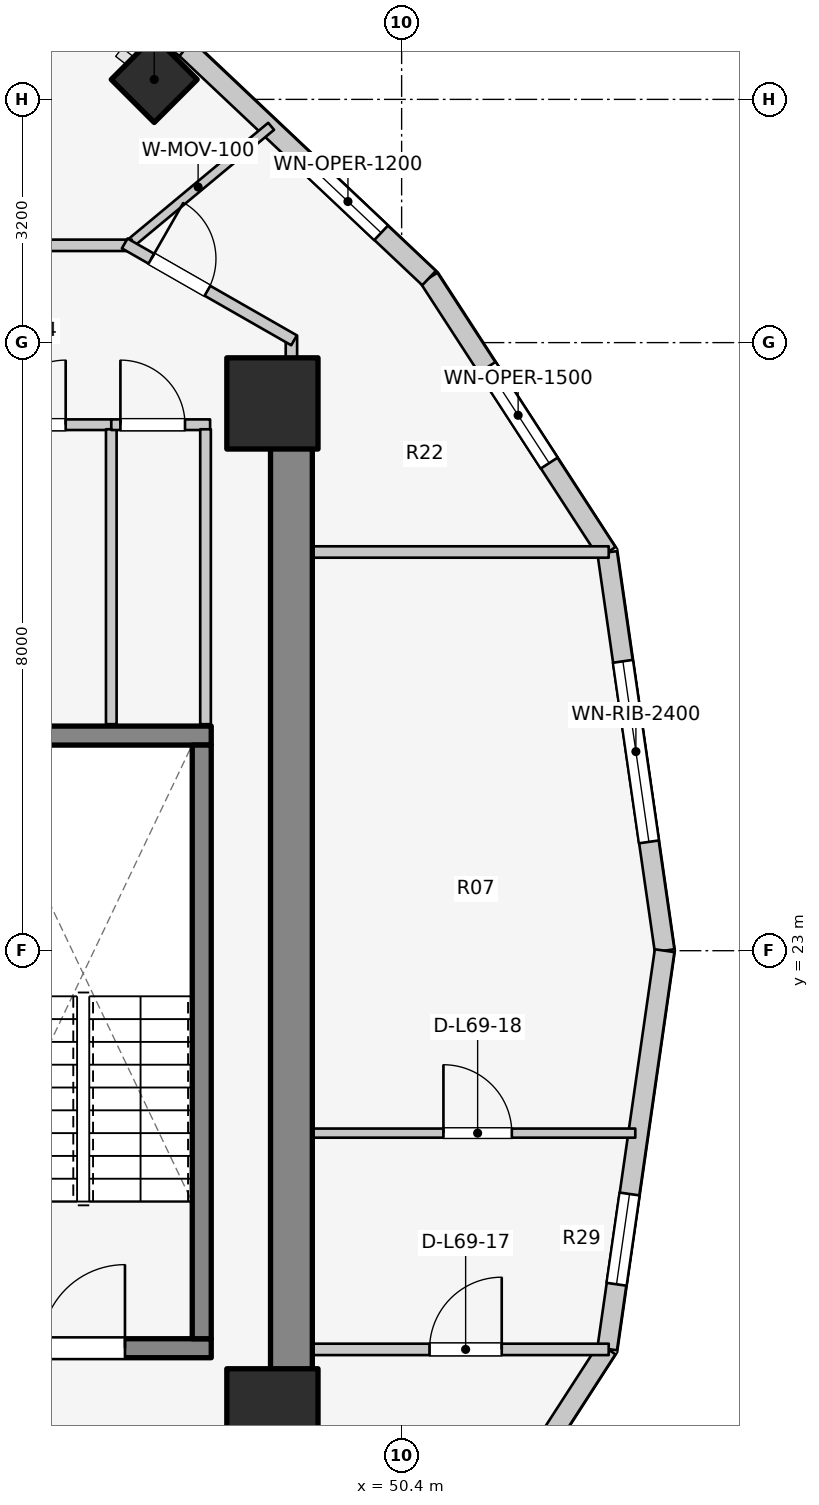
"""IFC4 building model, lengths in metres.
Left out: names, types, materials, properties, quantities, classifications, styles, units other than length and angle.
Written with IfcOpenShell. Run it as: python <this file> out.ifc"""

import sys

from ifc_helpers import new_model, si_unit, direction, frame, frame_2d, origin, origin_2d, place, context, subcontext, project, spatial, rectangle, extrude, element, fill, save


model = new_model("IFC4")
c1 = context("Model", 3, precision=1e-05, world=origin(), true_north=direction((0.0, 1.0)))
c2 = subcontext(c1, "Body", "Model", "MODEL_VIEW")
j1 = project(units=[si_unit("LENGTHUNIT", "METRE"), si_unit("PLANEANGLEUNIT", "RADIAN")], contexts=[c1])
p1 = place(None, origin())
s1 = spatial("IfcSite", under=j1, at=p1, CompositionType="ELEMENT")
p2 = place(p1, origin())
s2 = spatial("IfcBuilding", under=s1, at=p2, CompositionType="ELEMENT")
p3 = place(p2, frame((0.0, 0.0, 226.4)))
s3 = spatial("IfcBuildingStorey", under=s2, at=p3, CompositionType="ELEMENT", Elevation=226.4)
p4 = place(p3, frame((48.95, 17.05, 0.0), z_axis=(0.0, 0.0, 1.0), x_axis=(0.0, 1.0, 0.0)))
e1 = element("IfcWall", 1, at=p4, inside=s3, PredefinedType="SHEAR", context=c2, shape_type="SweptSolid", body=[
    extrude(rectangle(XDim=12.8, YDim=0.55, at=frame_2d((6.4, 0.0))), origin(), (0.0, 0.0, 1.0), 3.1),
])
p5 = place(p3, frame((44.525, 17.77, 0.0), z_axis=(0.0, 0.0, 1.0), x_axis=(1.0, 0.0, 0.0)))
e2 = element("IfcWall", 2, at=p5, inside=s3, PredefinedType="SOLIDWALL", context=c2, shape_type="SweptSolid", body=[
    extrude(rectangle(XDim=3.37, YDim=0.25, at=frame_2d((1.685, 0.0))), origin(), (0.0, 0.0, 1.0), 3.1),
])
p6 = place(p5, frame((1.135, 0.0, 0.0)))
e3 = element("IfcOpeningElement", 3, at=p6, cuts=e2, PredefinedType="OPENING", context=c2, shape_type="SweptSolid", body=[
    extrude(rectangle(XDim=1.1, YDim=2.1, at=frame_2d((0.55, 1.05))), frame((0.0, 0.135, 0.0), z_axis=(0.0, -1.0, 0.0), x_axis=(1.0, 0.0, 0.0)), (0.0, 0.0, 1.0), 0.27),
])
p7 = place(p3, frame((44.525, 25.83, 0.0), z_axis=(0.0, 0.0, 1.0), x_axis=(1.0, 0.0, 0.0)))
e4 = element("IfcWall", 4, at=p7, inside=s3, PredefinedType="SOLIDWALL", context=c2, shape_type="SweptSolid", body=[
    extrude(rectangle(XDim=3.37, YDim=0.25, at=frame_2d((1.685, 0.0))), origin(), (0.0, 0.0, 1.0), 3.1),
])
p8 = place(p3, frame((47.77, 17.895, 0.0), z_axis=(0.0, 0.0, 1.0), x_axis=(0.0, 1.0, 0.0)))
e5 = element("IfcWall", 5, at=p8, inside=s3, PredefinedType="SOLIDWALL", context=c2, shape_type="SweptSolid", body=[
    extrude(rectangle(XDim=7.81, YDim=0.25, at=frame_2d((3.905, 0.0))), origin(), (0.0, 0.0, 1.0), 3.1),
])
for number, where, z_axis, x_axis in (
    (6, (48.7, 16.9, 0.0), (0.0, 0.0, 1.0), (1.0, 0.0, 0.0)),
    (7, (48.7, 30.2, 0.0), (0.0, 0.0, 1.0), (1.0, 0.0, 0.0)),
):
    element("IfcColumn", number, at=place(p3, frame(where, z_axis=z_axis, x_axis=x_axis)), inside=s3, PredefinedType="COLUMN", context=c2, shape_type="SweptSolid", body=[
        extrude(rectangle(XDim=1.2, YDim=1.2, at=origin_2d()), origin(), (0.0, 0.0, 1.0), 3.1),
    ])
p9 = place(p3, frame((47.145, 34.462, 0.0), z_axis=(0.0, 0.0, 1.0), x_axis=(0.707106781187, 0.707106781187, 0.0)))
e8 = element("IfcColumn", 8, at=p9, inside=s3, PredefinedType="COLUMN", context=c2, shape_type="SweptSolid", body=[
    extrude(rectangle(XDim=0.8, YDim=0.8, at=origin_2d()), origin(), (0.0, 0.0, 1.0), 3.1),
])
p10 = place(p3, frame((53.86, 23.0, 0.0), z_axis=(0.0, 0.0, 1.0), x_axis=(-0.142712754019, 0.989764148593, 0.0)))
e9 = element("IfcWall", 9, at=p10, inside=s3, PredefinedType="STANDARD", context=c2, shape_type="SweptSolid", body=[
    extrude(rectangle(XDim=5.293, YDim=0.26, at=frame_2d((2.646, 0.0))), origin(), (0.0, 0.0, 1.0), 2.85),
])
p11 = place(p10, frame((1.447, 0.0, 0.75)))
e10 = element("IfcOpeningElement", 10, at=p11, cuts=e9, PredefinedType="OPENING", context=c2, shape_type="SweptSolid", body=[
    extrude(rectangle(XDim=2.4, YDim=1.7, at=frame_2d((1.2, 0.85))), frame((0.0, 0.14, 0.0), z_axis=(0.0, -1.0, 0.0), x_axis=(1.0, 0.0, 0.0)), (0.0, 0.0, 1.0), 0.28),
])
p12 = place(p3, frame((53.105, 28.239, 0.0), z_axis=(0.0, 0.0, 1.0), x_axis=(-0.544475908819, 0.838776480784, 0.0)))
e11 = element("IfcWall", 11, at=p12, inside=s3, PredefinedType="STANDARD", context=c2, shape_type="SweptSolid", body=[
    extrude(rectangle(XDim=4.305, YDim=0.26, at=frame_2d((2.152, 0.0))), origin(), (0.0, 0.0, 1.0), 2.85),
])
p13 = place(p12, frame((1.402, 0.0, 0.75)))
e12 = element("IfcOpeningElement", 12, at=p13, cuts=e11, PredefinedType="OPENING", context=c2, shape_type="SweptSolid", body=[
    extrude(rectangle(XDim=1.5, YDim=1.6, at=frame_2d((0.75, 0.8))), frame((0.0, 0.14, 0.0), z_axis=(0.0, -1.0, 0.0), x_axis=(1.0, 0.0, 0.0)), (0.0, 0.0, 1.0), 0.28),
])
p14 = place(p3, frame((50.761, 31.849, 0.0), z_axis=(0.0, 0.0, 1.0), x_axis=(-0.72731899451, 0.686299555752, 0.0)))
e13 = element("IfcWall", 13, at=p14, inside=s3, PredefinedType="STANDARD", context=c2, shape_type="SweptSolid", body=[
    extrude(rectangle(XDim=4.404, YDim=0.26, at=frame_2d((2.202, 0.0))), origin(), (0.0, 0.0, 1.0), 2.85),
])
p15 = place(p14, frame((0.867, 0.0, 0.75)))
e14 = element("IfcOpeningElement", 14, at=p15, cuts=e13, PredefinedType="OPENING", context=c2, shape_type="SweptSolid", body=[
    extrude(rectangle(XDim=1.2, YDim=1.5, at=frame_2d((0.6, 0.75))), frame((0.0, 0.14, 0.0), z_axis=(0.0, -1.0, 0.0), x_axis=(1.0, 0.0, 0.0)), (0.0, 0.0, 1.0), 0.28),
])
p16 = place(p3, frame((47.558, 34.872, 0.0), z_axis=(0.0, 0.0, 1.0), x_axis=(-0.790126214723, 0.612944177563, 0.0)))
e15 = element("IfcWall", 15, at=p16, inside=s3, PredefinedType="STANDARD", context=c2, shape_type="SweptSolid", body=[
    extrude(rectangle(XDim=4.667, YDim=0.26, at=frame_2d((2.333, 0.0))), origin(), (0.0, 0.0, 1.0), 2.85),
])
p17 = place(p3, frame((50.761, 14.133, 0.0), z_axis=(0.0, 0.0, 1.0), x_axis=(0.542641766008, 0.839964233634, 0.0)))
e16 = element("IfcWall", 16, at=p17, inside=s3, PredefinedType="STANDARD", context=c2, shape_type="SweptSolid", body=[
    extrude(rectangle(XDim=4.319, YDim=0.26, at=frame_2d((2.16, 0.0))), origin(), (0.0, 0.0, 1.0), 2.85),
])
p18 = place(p17, frame((1.41, 0.0, 0.75)))
e17 = element("IfcOpeningElement", 17, at=p18, cuts=e16, PredefinedType="OPENING", context=c2, shape_type="SweptSolid", body=[
    extrude(rectangle(XDim=1.5, YDim=1.6, at=frame_2d((0.75, 0.8))), frame((0.0, 0.14, 0.0), z_axis=(0.0, -1.0, 0.0), x_axis=(1.0, 0.0, 0.0)), (0.0, 0.0, 1.0), 0.28),
])
p19 = place(p3, frame((53.105, 17.761, 0.0), z_axis=(0.0, 0.0, 1.0), x_axis=(0.142712754019, 0.989764148593, 0.0)))
e18 = element("IfcWall", 18, at=p19, inside=s3, PredefinedType="STANDARD", context=c2, shape_type="SweptSolid", body=[
    extrude(rectangle(XDim=5.293, YDim=0.26, at=frame_2d((2.646, 0.0))), origin(), (0.0, 0.0, 1.0), 2.85),
])
p20 = place(p19, frame((0.859, 0.0, 0.75)))
e19 = element("IfcOpeningElement", 19, at=p20, cuts=e18, PredefinedType="OPENING", context=c2, shape_type="SweptSolid", body=[
    extrude(rectangle(XDim=1.2, YDim=1.5, at=frame_2d((0.6, 0.75))), frame((0.0, 0.14, 0.0), z_axis=(0.0, -1.0, 0.0), x_axis=(1.0, 0.0, 0.0)), (0.0, 0.0, 1.0), 0.28),
])
p21 = place(p3, frame((44.58, 29.92, 0.0), z_axis=(0.0, 0.0, 1.0), x_axis=(1.0, 0.0, 0.0)))
e20 = element("IfcWall", 20, at=p21, inside=s3, PredefinedType="PLUMBINGWALL", context=c2, shape_type="SweptSolid", body=[
    extrude(rectangle(XDim=2.0, YDim=0.14, at=frame_2d((1.0, 0.0))), origin(), (0.0, 0.0, 1.0), 2.855),
])
p22 = place(p21, frame((0.55, 0.0, 0.0)))
e21 = element("IfcOpeningElement", 21, at=p22, cuts=e20, PredefinedType="OPENING", context=c2, shape_type="SweptSolid", body=[
    extrude(rectangle(XDim=0.85, YDim=2.05, at=frame_2d((0.425, 1.025))), frame((0.0, 0.08, 0.0), z_axis=(0.0, -1.0, 0.0), x_axis=(1.0, 0.0, 0.0)), (0.0, 0.0, 1.0), 0.16),
])
p23 = place(p3, frame((46.58, 25.98, 0.0), z_axis=(0.0, 0.0, 1.0), x_axis=(0.0, 1.0, 0.0)))
e22 = element("IfcWall", 22, at=p23, inside=s3, PredefinedType="PLUMBINGWALL", context=c2, shape_type="SweptSolid", body=[
    extrude(rectangle(XDim=3.88, YDim=0.14, at=frame_2d((1.94, 0.0))), origin(), (0.0, 0.0, 1.0), 2.855),
])
p24 = place(p3, frame((46.58, 29.92, 0.0), z_axis=(0.0, 0.0, 1.0), x_axis=(1.0, 0.0, 0.0)))
e23 = element("IfcWall", 23, at=p24, inside=s3, PredefinedType="PLUMBINGWALL", context=c2, shape_type="SweptSolid", body=[
    extrude(rectangle(XDim=1.3, YDim=0.14, at=frame_2d((0.65, 0.0))), origin(), (0.0, 0.0, 1.0), 2.855),
])
p25 = place(p24, frame((0.12, 0.0, 0.0)))
e24 = element("IfcOpeningElement", 24, at=p25, cuts=e23, PredefinedType="OPENING", context=c2, shape_type="SweptSolid", body=[
    extrude(rectangle(XDim=0.85, YDim=2.05, at=frame_2d((0.425, 1.025))), frame((0.0, 0.08, 0.0), z_axis=(0.0, -1.0, 0.0), x_axis=(1.0, 0.0, 0.0)), (0.0, 0.0, 1.0), 0.16),
])
p26 = place(p3, frame((47.82, 25.98, 0.0), z_axis=(0.0, 0.0, 1.0), x_axis=(0.0, 1.0, 0.0)))
e25 = element("IfcWall", 25, at=p26, inside=s3, PredefinedType="PLUMBINGWALL", context=c2, shape_type="SweptSolid", body=[
    extrude(rectangle(XDim=3.88, YDim=0.14, at=frame_2d((1.94, 0.0))), origin(), (0.0, 0.0, 1.0), 2.855),
])
p27 = place(p3, frame((48.95, 17.755, 0.0), z_axis=(0.0, 0.0, 1.0), x_axis=(1.0, 0.0, 0.0)))
e26 = element("IfcWall", 26, at=p27, inside=s3, PredefinedType="PARTITIONING", context=c2, shape_type="SweptSolid", body=[
    extrude(rectangle(XDim=4.175, YDim=0.15, at=frame_2d((2.087, 0.0))), origin(), (0.0, 0.0, 1.0), 2.855),
])
p28 = place(p27, frame((1.817, 0.0, 0.0)))
e27 = element("IfcOpeningElement", 27, at=p28, cuts=e26, PredefinedType="OPENING", context=c2, shape_type="SweptSolid", body=[
    extrude(rectangle(XDim=0.95, YDim=2.1, at=frame_2d((0.475, 1.05))), frame((0.0, 0.085, 0.0), z_axis=(0.0, -1.0, 0.0), x_axis=(1.0, 0.0, 0.0)), (0.0, 0.0, 1.0), 0.17),
])
p29 = place(p3, frame((48.95, 28.245, 0.0), z_axis=(0.0, 0.0, 1.0), x_axis=(1.0, 0.0, 0.0)))
e28 = element("IfcWall", 28, at=p29, inside=s3, PredefinedType="PARTITIONING", context=c2, shape_type="SweptSolid", body=[
    extrude(rectangle(XDim=4.175, YDim=0.15, at=frame_2d((2.087, 0.0))), origin(), (0.0, 0.0, 1.0), 2.855),
])
p30 = place(p3, frame((48.95, 20.6, 0.0), z_axis=(0.0, 0.0, 1.0), x_axis=(1.0, 0.0, 0.0)))
e29 = element("IfcWall", 29, at=p30, inside=s3, PredefinedType="MOVABLE", context=c2, shape_type="SweptSolid", body=[
    extrude(rectangle(XDim=4.524, YDim=0.12, at=frame_2d((2.262, 0.0))), origin(), (0.0, 0.0, 1.0), 2.855),
])
p31 = place(p30, frame((2.0, 0.0, 0.0)))
e30 = element("IfcOpeningElement", 30, at=p31, cuts=e29, PredefinedType="OPENING", context=c2, shape_type="SweptSolid", body=[
    extrude(rectangle(XDim=0.9, YDim=2.1, at=frame_2d((0.45, 1.05))), frame((0.0, 0.07, 0.0), z_axis=(0.0, -1.0, 0.0), x_axis=(1.0, 0.0, 0.0)), (0.0, 0.0, 1.0), 0.14),
])
p32 = place(p3, frame((48.95, 29.8, 0.0), z_axis=(0.0, 0.0, 1.0), x_axis=(0.0, 1.0, 0.0)))
e31 = element("IfcWall", 31, at=p32, inside=s3, PredefinedType="PARTITIONING", context=c2, shape_type="SweptSolid", body=[
    extrude(rectangle(XDim=1.29, YDim=0.15, at=frame_2d((0.645, 0.0))), origin(), (0.0, 0.0, 1.0), 2.855),
])
p33 = place(p3, frame((46.762, 32.248, 0.0), z_axis=(0.0, 0.0, 1.0), x_axis=(0.76890954941, 0.639357571962, 0.0)))
e32 = element("IfcWall", 32, at=p33, inside=s3, PredefinedType="MOVABLE", context=c2, shape_type="SweptSolid", body=[
    extrude(rectangle(XDim=2.499, YDim=0.12, at=frame_2d((1.25, 0.0))), origin(), (0.0, 0.0, 1.0), 2.22),
])
p34 = place(p3, frame((39.33, 32.28, 0.0), z_axis=(0.0, 0.0, 1.0), x_axis=(1.0, 0.0, 0.0)))
e33 = element("IfcWall", 33, at=p34, inside=s3, PredefinedType="PARTITIONING", context=c2, shape_type="SweptSolid", body=[
    extrude(rectangle(XDim=7.52, YDim=0.15, at=frame_2d((3.76, 0.0))), origin(), (0.0, 0.0, 1.0), 2.376),
])
p35 = place(p34, frame((5.22, 0.0, 0.0)))
e34 = element("IfcOpeningElement", 34, at=p35, cuts=e33, PredefinedType="OPENING", context=c2, shape_type="SweptSolid", body=[
    extrude(rectangle(XDim=0.9, YDim=2.1, at=frame_2d((0.45, 1.05))), frame((0.0, 0.085, 0.0), z_axis=(0.0, -1.0, 0.0), x_axis=(1.0, 0.0, 0.0)), (0.0, 0.0, 1.0), 0.17),
])
p36 = place(p3, frame((46.757, 32.305, 0.0), z_axis=(0.0, 0.0, 1.0), x_axis=(0.867991349648, -0.496579315857, 0.0)))
e35 = element("IfcWall", 35, at=p36, inside=s3, PredefinedType="PARTITIONING", context=c2, shape_type="SweptSolid", body=[
    extrude(rectangle(XDim=2.567, YDim=0.15, at=frame_2d((1.283, 0.0))), origin(), (0.0, 0.0, 1.0), 2.22),
])
p37 = place(p36, frame((0.404, 0.0, 0.0)))
e36 = element("IfcOpeningElement", 36, at=p37, cuts=e35, PredefinedType="OPENING", context=c2, shape_type="SweptSolid", body=[
    extrude(rectangle(XDim=0.85, YDim=2.05, at=frame_2d((0.425, 1.025))), frame((0.0, 0.085, 0.0), z_axis=(0.0, -1.0, 0.0), x_axis=(1.0, 0.0, 0.0)), (0.0, 0.0, 1.0), 0.17),
])
p38 = place(p11, origin())
e37 = element("IfcWindow", 37, at=p38, inside=s3, PartitioningType="SINGLE_PANEL", PredefinedType="WINDOW", context=c2, shape_type="SweptSolid", body=[
    extrude(rectangle(XDim=2.4, YDim=1.7, at=frame_2d((1.2, 0.85))), frame((0.0, 0.03, 0.0), z_axis=(0.0, -1.0, 0.0), x_axis=(1.0, 0.0, 0.0)), (0.0, 0.0, 1.0), 0.06),
])
fill(e10, e37)
p39 = place(p13, origin())
e38 = element("IfcWindow", 38, at=p39, inside=s3, PartitioningType="SINGLE_PANEL", PredefinedType="WINDOW", context=c2, shape_type="SweptSolid", body=[
    extrude(rectangle(XDim=1.5, YDim=1.6, at=frame_2d((0.75, 0.8))), frame((0.0, 0.03, 0.0), z_axis=(0.0, -1.0, 0.0), x_axis=(1.0, 0.0, 0.0)), (0.0, 0.0, 1.0), 0.06),
])
fill(e12, e38)
p40 = place(p15, origin())
e39 = element("IfcWindow", 39, at=p40, inside=s3, PartitioningType="SINGLE_PANEL", PredefinedType="WINDOW", context=c2, shape_type="SweptSolid", body=[
    extrude(rectangle(XDim=1.2, YDim=1.5, at=frame_2d((0.6, 0.75))), frame((0.0, 0.03, 0.0), z_axis=(0.0, -1.0, 0.0), x_axis=(1.0, 0.0, 0.0)), (0.0, 0.0, 1.0), 0.06),
])
fill(e14, e39)
p41 = place(p20, origin())
e40 = element("IfcWindow", 40, at=p41, inside=s3, PartitioningType="SINGLE_PANEL", PredefinedType="WINDOW", context=c2, shape_type="SweptSolid", body=[
    extrude(rectangle(XDim=1.2, YDim=1.5, at=frame_2d((0.6, 0.75))), frame((0.0, 0.03, 0.0), z_axis=(0.0, -1.0, 0.0), x_axis=(1.0, 0.0, 0.0)), (0.0, 0.0, 1.0), 0.06),
])
fill(e19, e40)
p42 = place(p6, origin())
e41 = element("IfcDoor", 41, at=p42, inside=s3, OperationType="SINGLE_SWING_RIGHT", PredefinedType="DOOR", context=c2, shape_type="SweptSolid", body=[
    extrude(rectangle(XDim=1.1, YDim=2.1, at=frame_2d((0.55, 1.05))), frame((0.0, 0.025, 0.0), z_axis=(0.0, -1.0, 0.0), x_axis=(1.0, 0.0, 0.0)), (0.0, 0.0, 1.0), 0.05),
])
fill(e3, e41)
p43 = place(p22, origin())
e42 = element("IfcDoor", 42, at=p43, inside=s3, OperationType="SINGLE_SWING_RIGHT", PredefinedType="DOOR", context=c2, shape_type="SweptSolid", body=[
    extrude(rectangle(XDim=0.85, YDim=2.05, at=frame_2d((0.425, 1.025))), frame((0.0, 0.025, 0.0), z_axis=(0.0, -1.0, 0.0), x_axis=(1.0, 0.0, 0.0)), (0.0, 0.0, 1.0), 0.05),
])
fill(e21, e42)
p44 = place(p25, origin())
e43 = element("IfcDoor", 43, at=p44, inside=s3, OperationType="SINGLE_SWING_LEFT", PredefinedType="DOOR", context=c2, shape_type="SweptSolid", body=[
    extrude(rectangle(XDim=0.85, YDim=2.05, at=frame_2d((0.425, 1.025))), frame((0.0, 0.025, 0.0), z_axis=(0.0, -1.0, 0.0), x_axis=(1.0, 0.0, 0.0)), (0.0, 0.0, 1.0), 0.05),
])
fill(e24, e43)
p45 = place(p28, origin())
e44 = element("IfcDoor", 44, at=p45, inside=s3, OperationType="SINGLE_SWING_RIGHT", PredefinedType="DOOR", context=c2, shape_type="SweptSolid", body=[
    extrude(rectangle(XDim=0.95, YDim=2.1, at=frame_2d((0.475, 1.05))), frame((0.0, 0.025, 0.0), z_axis=(0.0, -1.0, 0.0), x_axis=(1.0, 0.0, 0.0)), (0.0, 0.0, 1.0), 0.05),
])
fill(e27, e44)
p46 = place(p31, origin())
e45 = element("IfcDoor", 45, at=p46, inside=s3, OperationType="SINGLE_SWING_LEFT", PredefinedType="DOOR", context=c2, shape_type="SweptSolid", body=[
    extrude(rectangle(XDim=0.9, YDim=2.1, at=frame_2d((0.45, 1.05))), frame((0.0, 0.025, 0.0), z_axis=(0.0, -1.0, 0.0), x_axis=(1.0, 0.0, 0.0)), (0.0, 0.0, 1.0), 0.05),
])
fill(e30, e45)
p47 = place(p37, origin())
e46 = element("IfcDoor", 46, at=p47, inside=s3, OperationType="SINGLE_SWING_LEFT", PredefinedType="DOOR", context=c2, shape_type="SweptSolid", body=[
    extrude(rectangle(XDim=0.85, YDim=2.05, at=frame_2d((0.425, 1.025))), frame((0.0, 0.025, 0.0), z_axis=(0.0, -1.0, 0.0), x_axis=(1.0, 0.0, 0.0)), (0.0, 0.0, 1.0), 0.05),
])
fill(e36, e46)
save(model, sys.argv[1])
